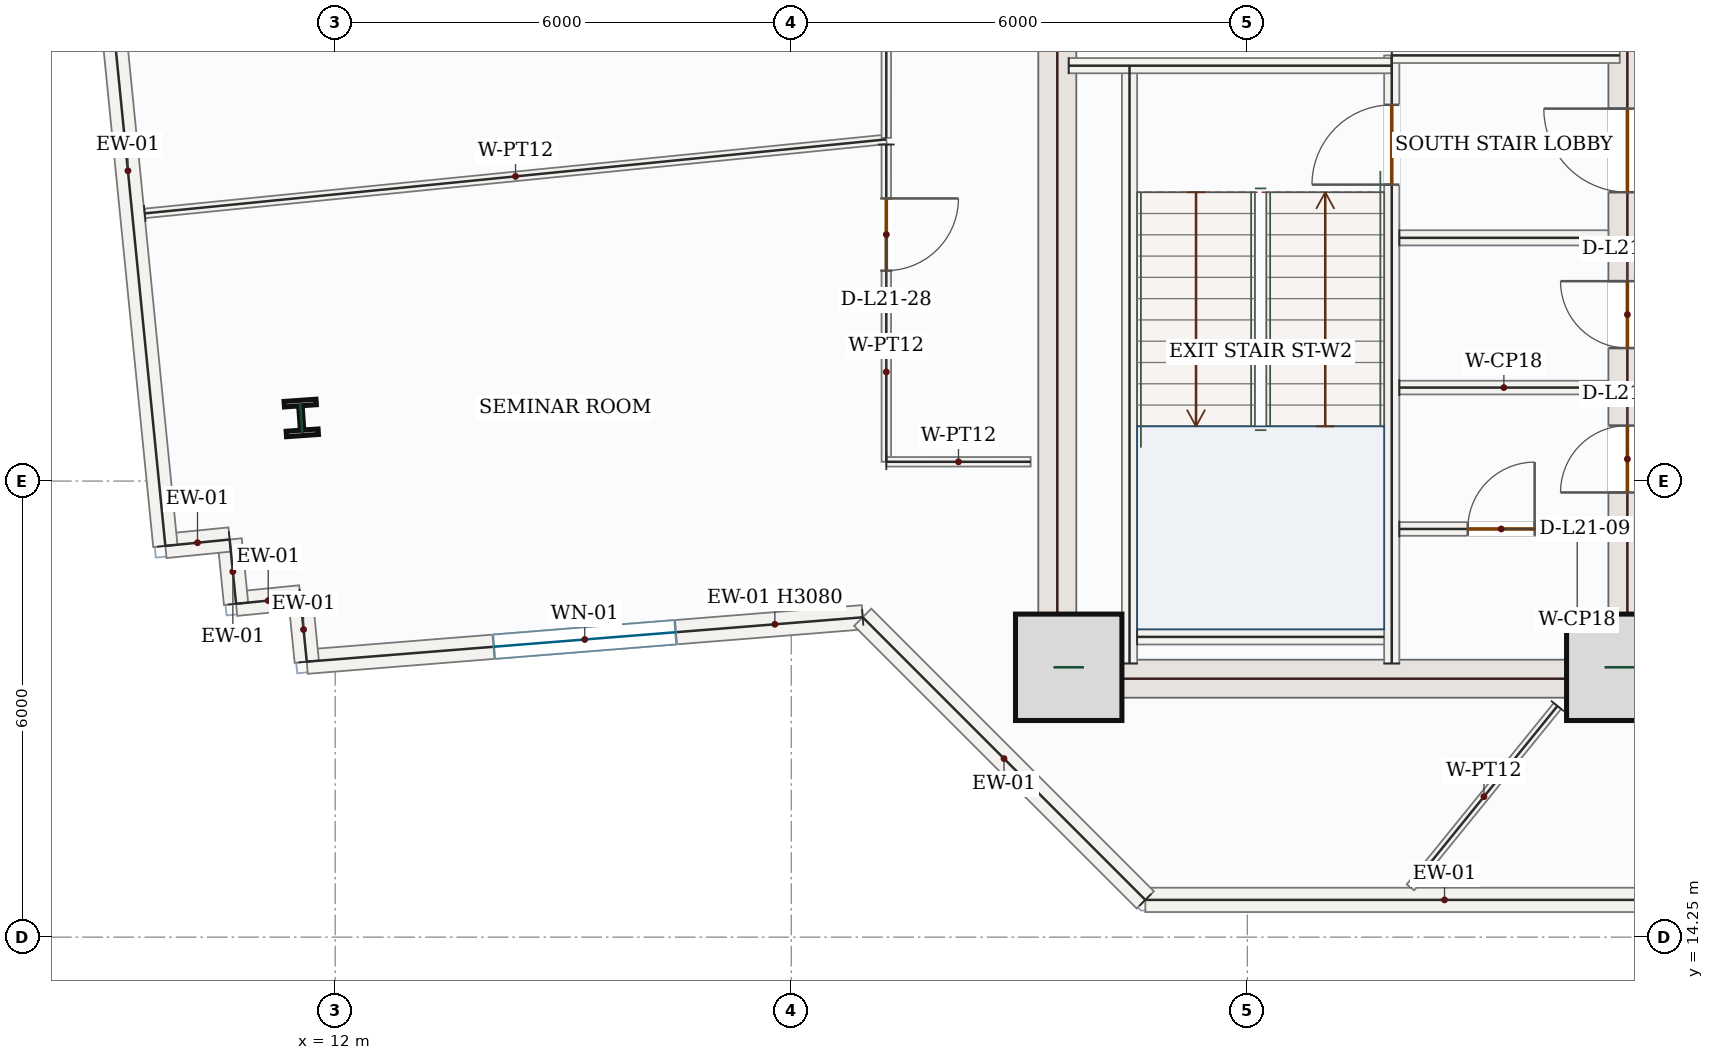
"""IFC4 building model, lengths in metres.
Left out: names, types, materials, properties, quantities, classifications, styles, units other than length and angle.
Written with IfcOpenShell. Run it as: python <this file> out.ifc"""

import sys

from ifc_helpers import new_model, si_unit, direction, frame, frame_2d, origin, origin_2d, place, context, subcontext, project, spatial, rectangle, i_section, extrude, source, transform, mapped, element, fill, save


model = new_model("IFC4")
c1 = context("Model", 3, precision=1e-05, world=origin(), true_north=direction((0.0, 1.0)))
c2 = subcontext(c1, "Body", "Model", "MODEL_VIEW")
j1 = project(units=[si_unit("LENGTHUNIT", "METRE"), si_unit("PLANEANGLEUNIT", "RADIAN")], contexts=[c1])
p1 = place(None, origin())
s1 = spatial("IfcSite", under=j1, at=p1, CompositionType="ELEMENT")
p2 = place(p1, origin())
s2 = spatial("IfcBuilding", under=s1, at=p2, CompositionType="ELEMENT")
p3 = place(p2, frame((0.0, 0.0, 96.3)))
s3 = spatial("IfcBuildingStorey", under=s2, at=p3, CompositionType="ELEMENT", Elevation=96.3)
m1 = source(origin(), c2, "Body", "SweptSolid", [
    extrude(rectangle(XDim=8.55, YDim=0.5, at=frame_2d((4.275, 0.0))), origin(), (0.0, 0.0, 1.0), 3.95),
])
p4 = place(p3, frame((21.5, 17.4, 0.0), z_axis=(0.0, 0.0, 1.0), x_axis=(0.0, 1.0, 0.0)))
e1 = element("IfcWall", 1, at=p4, inside=s3, PredefinedType="SHEAR", context=c2, shape_type="MappedRepresentation", body=[
    mapped(m1, transform((0.0, 0.0, 0.0), x_axis=(1.0, 0.0, 0.0), y_axis=(0.0, 1.0, 0.0), z_axis=(0.0, 0.0, 1.0), scale=1.0)),
])
p5 = place(p3, frame((29.0, 17.4, 0.0), z_axis=(0.0, 0.0, 1.0), x_axis=(0.0, 1.0, 0.0)))
e2 = element("IfcWall", 2, at=p5, inside=s3, PredefinedType="SHEAR", context=c2, shape_type="SweptSolid", body=[
    extrude(rectangle(XDim=8.55, YDim=0.5, at=frame_2d((4.275, 0.0))), origin(), (0.0, 0.0, 1.0), 3.95),
])
p6 = place(p5, frame((6.65, 0.0, 0.0)))
e3 = element("IfcOpeningElement", 3, at=p6, cuts=e2, PredefinedType="OPENING", context=c2, shape_type="SweptSolid", body=[
    extrude(rectangle(XDim=1.1, YDim=2.2, at=frame_2d((0.55, 1.1))), frame((0.0, 0.26, 0.0), z_axis=(0.0, -1.0, 0.0), x_axis=(1.0, 0.0, 0.0)), (0.0, 0.0, 1.0), 0.52),
])
p7 = place(p5, frame((2.7, 0.0, 0.0)))
e4 = element("IfcOpeningElement", 4, at=p7, cuts=e2, PredefinedType="OPENING", context=c2, shape_type="SweptSolid", body=[
    extrude(rectangle(XDim=0.88, YDim=2.1, at=frame_2d((0.44, 1.05))), frame((0.0, 0.26, 0.0), z_axis=(0.0, -1.0, 0.0), x_axis=(1.0, 0.0, 0.0)), (0.0, 0.0, 1.0), 0.52),
])
p8 = place(p5, frame((4.6, 0.0, 0.0)))
e5 = element("IfcOpeningElement", 5, at=p8, cuts=e2, PredefinedType="OPENING", context=c2, shape_type="SweptSolid", body=[
    extrude(rectangle(XDim=0.88, YDim=2.1, at=frame_2d((0.44, 1.05))), frame((0.0, 0.26, 0.0), z_axis=(0.0, -1.0, 0.0), x_axis=(1.0, 0.0, 0.0)), (0.0, 0.0, 1.0), 0.52),
])
m2 = source(origin(), c2, "Body", "SweptSolid", [
    extrude(rectangle(XDim=7.0, YDim=0.5, at=frame_2d((3.5, 0.0))), origin(), (0.0, 0.0, 1.0), 3.95),
])
p9 = place(p3, frame((21.75, 17.65, 0.0), z_axis=(0.0, 0.0, 1.0), x_axis=(1.0, 0.0, 0.0)))
e6 = element("IfcWall", 6, at=p9, inside=s3, PredefinedType="SHEAR", context=c2, shape_type="MappedRepresentation", body=[
    mapped(m2, transform((0.0, 0.0, 0.0), x_axis=(1.0, 0.0, 0.0), y_axis=(0.0, 1.0, 0.0), z_axis=(0.0, 0.0, 1.0), scale=1.0)),
])
m3 = source(origin(), c2, "Body", "SweptSolid", [
    extrude(rectangle(XDim=1.4, YDim=1.4, at=origin_2d()), origin(), (0.0, 0.0, 1.0), 4.2),
])
for number, where, z_axis, x_axis in (
    (7, (21.65, 17.8, 0.0), (0.0, 0.0, 1.0), (1.0, 0.0, 0.0)),
    (8, (28.9, 17.8, 0.0), (0.0, 0.0, 1.0), (1.0, 0.0, 0.0)),
):
    element("IfcColumn", number, at=place(p3, frame(where, z_axis=z_axis, x_axis=x_axis)), inside=s3, PredefinedType="COLUMN", context=c2, shape_type="MappedRepresentation", body=[
        mapped(m3, transform((0.0, 0.0, 0.0), x_axis=(1.0, 0.0, 0.0), y_axis=(0.0, 1.0, 0.0), z_axis=(0.0, 0.0, 1.0), scale=1.0)),
    ])
m4 = source(origin(), c2, "Body", "SweptSolid", [
    extrude(i_section(OverallWidth=0.421, OverallDepth=0.465, WebThickness=0.045, FlangeThickness=0.073, FilletRadius=0.018, at=origin_2d()), origin(), (0.0, 0.0, 1.0), 4.2),
])
p10 = place(p3, frame((11.553, 21.08, 0.0), z_axis=(0.0, 0.0, 1.0), x_axis=(0.99756405026, 0.069756473744, 0.0)))
e9 = element("IfcColumn", 9, at=p10, inside=s3, PredefinedType="COLUMN", context=c2, shape_type="MappedRepresentation", body=[
    mapped(m4, transform((0.0, 0.0, 0.0), x_axis=(1.0, 0.0, 0.0), y_axis=(0.0, 1.0, 0.0), z_axis=(0.0, 0.0, 1.0), scale=1.0)),
])
p11 = place(p3, frame((18.94, 18.458, 0.0), z_axis=(0.0, 0.0, 1.0), x_axis=(-0.996827539556, -0.079591811023, 0.0)))
e10 = element("IfcWall", 10, at=p11, inside=s3, PredefinedType="SOLIDWALL", context=c2, shape_type="SweptSolid", body=[
    extrude(rectangle(XDim=7.337, YDim=0.32, at=frame_2d((3.668, 0.0))), origin(), (0.0, 0.0, 1.0), 3.08),
])
p12 = place(p11, frame((2.469, 0.0, 0.85)))
e11 = element("IfcOpeningElement", 11, at=p12, cuts=e10, PredefinedType="OPENING", context=c2, shape_type="SweptSolid", body=[
    extrude(rectangle(XDim=2.4, YDim=1.8, at=frame_2d((1.2, 0.9))), frame((0.0, 0.17, 0.0), z_axis=(0.0, -1.0, 0.0), x_axis=(1.0, 0.0, 0.0)), (0.0, 0.0, 1.0), 0.34),
])
m5 = source(origin(), c2, "Body", "SweptSolid", [
    extrude(rectangle(XDim=0.85, YDim=0.32, at=frame_2d((0.425, 0.0))), origin(), (0.0, 0.0, 1.0), 3.95),
])
p13 = place(p3, frame((11.626, 17.874, 0.0), z_axis=(0.0, 0.0, 1.0), x_axis=(-0.09938995433, 0.995048560111, 0.0)))
e12 = element("IfcWall", 12, at=p13, inside=s3, PredefinedType="SOLIDWALL", context=c2, shape_type="MappedRepresentation", body=[
    mapped(m5, transform((0.0, 0.0, 0.0), x_axis=(1.0, 0.0, 0.0), y_axis=(0.0, 1.0, 0.0), z_axis=(0.0, 0.0, 1.0), scale=1.0)),
])
m6 = source(origin(), c2, "Body", "SweptSolid", [
    extrude(rectangle(XDim=0.85, YDim=0.32, at=frame_2d((0.425, 0.0))), origin(), (0.0, 0.0, 1.0), 3.95),
])
p14 = place(p3, frame((11.542, 18.72, 0.0), z_axis=(0.0, 0.0, 1.0), x_axis=(-0.995079749343, -0.09907720448, 0.0)))
e13 = element("IfcWall", 13, at=p14, inside=s3, PredefinedType="SOLIDWALL", context=c2, shape_type="MappedRepresentation", body=[
    mapped(m6, transform((0.0, 0.0, 0.0), x_axis=(1.0, 0.0, 0.0), y_axis=(0.0, 1.0, 0.0), z_axis=(0.0, 0.0, 1.0), scale=1.0)),
])
for number, where, z_axis, x_axis in (
    (14, (10.696, 18.635, 0.0), (0.0, 0.0, 1.0), (-0.099, 0.995, 0.0)),
    (15, (10.611, 19.481, 0.0), (0.0, 0.0, 1.0), (-0.995, -0.099, 0.0)),
):
    element("IfcWall", number, at=place(p3, frame(where, z_axis=z_axis, x_axis=x_axis)), inside=s3, PredefinedType="SOLIDWALL", context=c2, shape_type="MappedRepresentation", body=[
        mapped(m5, transform((0.0, 0.0, 0.0), x_axis=(1.0, 0.0, 0.0), y_axis=(0.0, 1.0, 0.0), z_axis=(0.0, 0.0, 1.0), scale=1.0)),
    ])
m7 = source(origin(), c2, "Body", "SweptSolid", [
    extrude(rectangle(XDim=9.92, YDim=0.32, at=frame_2d((4.96, 0.0))), origin(), (0.0, 0.0, 1.0), 3.95),
])
p15 = place(p3, frame((9.765, 19.397, 0.0), z_axis=(0.0, 0.0, 1.0), x_axis=(-0.099303907908, 0.995057151059, 0.0)))
e16 = element("IfcWall", 16, at=p15, inside=s3, PredefinedType="SOLIDWALL", context=c2, shape_type="MappedRepresentation", body=[
    mapped(m7, transform((0.0, 0.0, 0.0), x_axis=(1.0, 0.0, 0.0), y_axis=(0.0, 1.0, 0.0), z_axis=(0.0, 0.0, 1.0), scale=1.0)),
])
m8 = source(origin(), c2, "Body", "SweptSolid", [
    extrude(rectangle(XDim=7.873, YDim=0.32, at=frame_2d((3.936, 0.0))), origin(), (0.0, 0.0, 1.0), 3.95),
])
p16 = place(p3, frame((30.531, 14.74, 0.0), z_axis=(0.0, 0.0, 1.0), x_axis=(-1.0, 0.0, 0.0)))
e17 = element("IfcWall", 17, at=p16, inside=s3, PredefinedType="SOLIDWALL", context=c2, shape_type="MappedRepresentation", body=[
    mapped(m8, transform((0.0, 0.0, 0.0), x_axis=(1.0, 0.0, 0.0), y_axis=(0.0, 1.0, 0.0), z_axis=(0.0, 0.0, 1.0), scale=1.0)),
])
m9 = source(origin(), c2, "Body", "SweptSolid", [
    extrude(rectangle(XDim=5.258, YDim=0.32, at=frame_2d((2.629, 0.0))), origin(), (0.0, 0.0, 1.0), 3.95),
])
p17 = place(p3, frame((22.658, 14.74, 0.0), z_axis=(0.0, 0.0, 1.0), x_axis=(-0.707106781187, 0.707106781187, 0.0)))
e18 = element("IfcWall", 18, at=p17, inside=s3, PredefinedType="SOLIDWALL", context=c2, shape_type="MappedRepresentation", body=[
    mapped(m9, transform((0.0, 0.0, 0.0), x_axis=(1.0, 0.0, 0.0), y_axis=(0.0, 1.0, 0.0), z_axis=(0.0, 0.0, 1.0), scale=1.0)),
])
m10 = source(origin(), c2, "Body", "SweptSolid", [
    extrude(rectangle(XDim=7.87, YDim=0.2, at=frame_2d((3.935, 0.0))), origin(), (0.0, 0.0, 1.0), 3.95),
])
p18 = place(p3, frame((22.45, 17.85, 0.0), z_axis=(0.0, 0.0, 1.0), x_axis=(0.0, 1.0, 0.0)))
e19 = element("IfcWall", 19, at=p18, inside=s3, PredefinedType="SOLIDWALL", context=c2, shape_type="MappedRepresentation", body=[
    mapped(m10, transform((0.0, 0.0, 0.0), x_axis=(1.0, 0.0, 0.0), y_axis=(0.0, 1.0, 0.0), z_axis=(0.0, 0.0, 1.0), scale=1.0)),
])
p19 = place(p3, frame((25.9, 17.85, 0.0), z_axis=(0.0, 0.0, 1.0), x_axis=(0.0, 1.0, 0.0)))
e20 = element("IfcWall", 20, at=p19, inside=s3, PredefinedType="SOLIDWALL", context=c2, shape_type="SweptSolid", body=[
    extrude(rectangle(XDim=8.0, YDim=0.2, at=frame_2d((4.0, 0.0))), origin(), (0.0, 0.0, 1.0), 3.95),
])
p20 = place(p19, frame((6.3, 0.0, 0.0)))
e21 = element("IfcOpeningElement", 21, at=p20, cuts=e20, PredefinedType="OPENING", context=c2, shape_type="SweptSolid", body=[
    extrude(rectangle(XDim=1.05, YDim=2.15, at=frame_2d((0.525, 1.075))), frame((0.0, 0.11, 0.0), z_axis=(0.0, -1.0, 0.0), x_axis=(1.0, 0.0, 0.0)), (0.0, 0.0, 1.0), 0.22),
])
m11 = source(origin(), c2, "Body", "SweptSolid", [
    extrude(rectangle(XDim=4.25, YDim=0.2, at=frame_2d((2.125, 0.0))), origin(), (0.0, 0.0, 1.0), 3.95),
])
p21 = place(p3, frame((21.65, 25.715, 0.0), z_axis=(0.0, 0.0, 1.0), x_axis=(1.0, 0.0, 0.0)))
e22 = element("IfcWall", 22, at=p21, inside=s3, PredefinedType="SOLIDWALL", context=c2, shape_type="MappedRepresentation", body=[
    mapped(m11, transform((0.0, 0.0, 0.0), x_axis=(1.0, 0.0, 0.0), y_axis=(0.0, 1.0, 0.0), z_axis=(0.0, 0.0, 1.0), scale=1.0)),
])
m12 = source(origin(), c2, "Body", "SweptSolid", [
    extrude(rectangle(XDim=3.0, YDim=0.2, at=frame_2d((1.5, 0.0))), origin(), (0.0, 0.0, 1.0), 3.95),
])
p22 = place(p3, frame((25.9, 25.85, 0.0), z_axis=(0.0, 0.0, 1.0), x_axis=(1.0, 0.0, 0.0)))
e23 = element("IfcWall", 23, at=p22, inside=s3, PredefinedType="SOLIDWALL", context=c2, shape_type="MappedRepresentation", body=[
    mapped(m12, transform((0.0, 0.0, 0.0), x_axis=(1.0, 0.0, 0.0), y_axis=(0.0, 1.0, 0.0), z_axis=(0.0, 0.0, 1.0), scale=1.0)),
])
m13 = source(origin(), c2, "Body", "SweptSolid", [
    extrude(rectangle(XDim=3.25, YDim=0.2, at=frame_2d((1.625, 0.0))), origin(), (0.0, 0.0, 1.0), 3.95),
])
p23 = place(p3, frame((22.55, 18.2, 0.0), z_axis=(0.0, 0.0, 1.0), x_axis=(1.0, 0.0, 0.0)))
e24 = element("IfcWall", 24, at=p23, inside=s3, PredefinedType="SOLIDWALL", context=c2, shape_type="MappedRepresentation", body=[
    mapped(m13, transform((0.0, 0.0, 0.0), x_axis=(1.0, 0.0, 0.0), y_axis=(0.0, 1.0, 0.0), z_axis=(0.0, 0.0, 1.0), scale=1.0)),
])
m14 = source(origin(), c2, "Body", "SweptSolid", [
    extrude(rectangle(XDim=2.75, YDim=0.2, at=frame_2d((1.375, 0.0))), origin(), (0.0, 0.0, 1.0), 3.95),
])
p24 = place(p3, frame((26.0, 23.45, 0.0), z_axis=(0.0, 0.0, 1.0), x_axis=(1.0, 0.0, 0.0)))
e25 = element("IfcWall", 25, at=p24, inside=s3, PredefinedType="SOLIDWALL", context=c2, shape_type="MappedRepresentation", body=[
    mapped(m14, transform((0.0, 0.0, 0.0), x_axis=(1.0, 0.0, 0.0), y_axis=(0.0, 1.0, 0.0), z_axis=(0.0, 0.0, 1.0), scale=1.0)),
])
p25 = place(p3, frame((26.0, 19.62, 0.0), z_axis=(0.0, 0.0, 1.0), x_axis=(1.0, 0.0, 0.0)))
e26 = element("IfcWall", 26, at=p25, inside=s3, PredefinedType="PARTITIONING", context=c2, shape_type="SweptSolid", body=[
    extrude(rectangle(XDim=2.75, YDim=0.18, at=frame_2d((1.375, 0.0))), origin(), (0.0, 0.0, 1.0), 3.95),
])
p26 = place(p25, frame((0.9, 0.0, 0.0)))
e27 = element("IfcOpeningElement", 27, at=p26, cuts=e26, PredefinedType="OPENING", context=c2, shape_type="SweptSolid", body=[
    extrude(rectangle(XDim=0.88, YDim=2.1, at=frame_2d((0.44, 1.05))), frame((0.0, 0.1, 0.0), z_axis=(0.0, -1.0, 0.0), x_axis=(1.0, 0.0, 0.0)), (0.0, 0.0, 1.0), 0.2),
])
m15 = source(origin(), c2, "Body", "SweptSolid", [
    extrude(rectangle(XDim=2.75, YDim=0.18, at=frame_2d((1.375, 0.0))), origin(), (0.0, 0.0, 1.0), 3.95),
])
p27 = place(p3, frame((26.0, 21.48, 0.0), z_axis=(0.0, 0.0, 1.0), x_axis=(1.0, 0.0, 0.0)))
e28 = element("IfcWall", 28, at=p27, inside=s3, PredefinedType="PARTITIONING", context=c2, shape_type="MappedRepresentation", body=[
    mapped(m15, transform((0.0, 0.0, 0.0), x_axis=(1.0, 0.0, 0.0), y_axis=(0.0, 1.0, 0.0), z_axis=(0.0, 0.0, 1.0), scale=1.0)),
])
m16 = source(origin(), c2, "Body", "SweptSolid", [
    extrude(rectangle(XDim=3.072, YDim=0.125, at=frame_2d((1.536, 0.0))), origin(), (0.0, 0.0, 1.0), 3.95),
])
p28 = place(p3, frame((28.08, 17.291, 0.0), z_axis=(0.0, 0.0, 1.0), x_axis=(-0.629760486176, -0.776789373029, 0.0)))
e29 = element("IfcWall", 29, at=p28, inside=s3, PredefinedType="PARTITIONING", context=c2, shape_type="MappedRepresentation", body=[
    mapped(m16, transform((0.0, 0.0, 0.0), x_axis=(1.0, 0.0, 0.0), y_axis=(0.0, 1.0, 0.0), z_axis=(0.0, 0.0, 1.0), scale=1.0)),
])
m17 = source(origin(), c2, "Body", "SweptSolid", [
    extrude(rectangle(XDim=9.804, YDim=0.125, at=frame_2d((4.902, 0.0))), origin(), (0.0, 0.0, 1.0), 3.95),
])
p29 = place(p3, frame((9.495, 23.771, 0.0), z_axis=(0.0, 0.0, 1.0), x_axis=(0.995053942122, 0.099336057238, 0.0)))
e30 = element("IfcWall", 30, at=p29, inside=s3, PredefinedType="PARTITIONING", context=c2, shape_type="MappedRepresentation", body=[
    mapped(m17, transform((0.0, 0.0, 0.0), x_axis=(1.0, 0.0, 0.0), y_axis=(0.0, 1.0, 0.0), z_axis=(0.0, 0.0, 1.0), scale=1.0)),
])
p30 = place(p3, frame((19.25, 24.677, 0.0), z_axis=(0.0, 0.0, 1.0), x_axis=(0.000116979586, -0.999999993158, 0.0)))
e31 = element("IfcWall", 31, at=p30, inside=s3, PredefinedType="PARTITIONING", context=c2, shape_type="SweptSolid", body=[
    extrude(rectangle(XDim=4.174, YDim=0.125, at=frame_2d((2.087, 0.0))), origin(), (0.0, 0.0, 1.0), 3.95),
])
p31 = place(p30, frame((0.709, 0.0, 0.0)))
e32 = element("IfcOpeningElement", 32, at=p31, cuts=e31, PredefinedType="OPENING", context=c2, shape_type="SweptSolid", body=[
    extrude(rectangle(XDim=0.95, YDim=2.15, at=frame_2d((0.475, 1.075))), frame((0.0, 0.073, 0.0), z_axis=(0.0, -1.0, 0.0), x_axis=(1.0, 0.0, 0.0)), (0.0, 0.0, 1.0), 0.145),
])
m18 = source(origin(), c2, "Body", "SweptSolid", [
    extrude(rectangle(XDim=1.899, YDim=0.125, at=frame_2d((0.949, 0.0))), origin(), (0.0, 0.0, 1.0), 3.95),
])
p32 = place(p3, frame((19.25, 20.503, 0.0), z_axis=(0.0, 0.0, 1.0), x_axis=(0.999999991735, 0.000128567754, 0.0)))
e33 = element("IfcWall", 33, at=p32, inside=s3, PredefinedType="PARTITIONING", context=c2, shape_type="MappedRepresentation", body=[
    mapped(m18, transform((0.0, 0.0, 0.0), x_axis=(1.0, 0.0, 0.0), y_axis=(0.0, 1.0, 0.0), z_axis=(0.0, 0.0, 1.0), scale=1.0)),
])
p33 = place(p3, frame((19.253, 33.497, 0.0), z_axis=(0.0, 0.0, 1.0), x_axis=(-0.000307554646, -0.999999952705, 0.0)))
e34 = element("IfcWall", 34, at=p33, inside=s3, PredefinedType="PARTITIONING", context=c2, shape_type="SweptSolid", body=[
    extrude(rectangle(XDim=8.732, YDim=0.125, at=frame_2d((4.366, 0.0))), origin(), (0.0, 0.0, 1.0), 3.95),
])
p34 = place(p33, frame((6.07, 0.0, 0.0)))
e35 = element("IfcOpeningElement", 35, at=p34, cuts=e34, PredefinedType="OPENING", context=c2, shape_type="SweptSolid", body=[
    extrude(rectangle(XDim=0.95, YDim=2.15, at=frame_2d((0.475, 1.075))), frame((0.0, 0.073, 0.0), z_axis=(0.0, -1.0, 0.0), x_axis=(1.0, 0.0, 0.0)), (0.0, 0.0, 1.0), 0.145),
])
m19 = source(origin(), c2, "Body", "SweptSolid", [
    extrude(rectangle(XDim=2.4, YDim=1.8, at=frame_2d((1.2, 0.9))), frame((0.0, 0.03, 0.0), z_axis=(0.0, -1.0, 0.0), x_axis=(1.0, 0.0, 0.0)), (0.0, 0.0, 1.0), 0.06),
])
p35 = place(p12, origin())
e36 = element("IfcWindow", 36, at=p35, inside=s3, PartitioningType="DOUBLE_PANEL_VERTICAL", PredefinedType="WINDOW", context=c2, shape_type="MappedRepresentation", body=[
    mapped(m19, transform((0.0, 0.0, 0.0), x_axis=(1.0, 0.0, 0.0), y_axis=(0.0, 1.0, 0.0), z_axis=(0.0, 0.0, 1.0), scale=1.0)),
])
fill(e11, e36)
m20 = source(origin(), c2, "Body", "SweptSolid", [
    extrude(rectangle(XDim=1.05, YDim=2.15, at=frame_2d((0.525, 1.075))), frame((0.0, 0.025, 0.0), z_axis=(0.0, -1.0, 0.0), x_axis=(1.0, 0.0, 0.0)), (0.0, 0.0, 1.0), 0.05),
])
p36 = place(p20, origin())
e37 = element("IfcDoor", 37, at=p36, inside=s3, OperationType="SINGLE_SWING_LEFT", PredefinedType="DOOR", context=c2, shape_type="MappedRepresentation", body=[
    mapped(m20, transform((0.0, 0.0, 0.0), x_axis=(1.0, 0.0, 0.0), y_axis=(0.0, 1.0, 0.0), z_axis=(0.0, 0.0, 1.0), scale=1.0)),
])
fill(e21, e37)
m21 = source(origin(), c2, "Body", "SweptSolid", [
    extrude(rectangle(XDim=1.1, YDim=2.2, at=frame_2d((0.55, 1.1))), frame((0.0, 0.025, 0.0), z_axis=(0.0, -1.0, 0.0), x_axis=(1.0, 0.0, 0.0)), (0.0, 0.0, 1.0), 0.05),
])
p37 = place(p6, origin())
e38 = element("IfcDoor", 38, at=p37, inside=s3, OperationType="SINGLE_SWING_RIGHT", PredefinedType="DOOR", context=c2, shape_type="MappedRepresentation", body=[
    mapped(m21, transform((0.0, 0.0, 0.0), x_axis=(1.0, 0.0, 0.0), y_axis=(0.0, 1.0, 0.0), z_axis=(0.0, 0.0, 1.0), scale=1.0)),
])
fill(e3, e38)
m22 = source(origin(), c2, "Body", "SweptSolid", [
    extrude(rectangle(XDim=0.88, YDim=2.1, at=frame_2d((0.44, 1.05))), frame((0.0, 0.025, 0.0), z_axis=(0.0, -1.0, 0.0), x_axis=(1.0, 0.0, 0.0)), (0.0, 0.0, 1.0), 0.05),
])
p38 = place(p26, origin())
e39 = element("IfcDoor", 39, at=p38, inside=s3, OperationType="SINGLE_SWING_RIGHT", PredefinedType="DOOR", context=c2, shape_type="MappedRepresentation", body=[
    mapped(m22, transform((0.0, 0.0, 0.0), x_axis=(1.0, 0.0, 0.0), y_axis=(0.0, 1.0, 0.0), z_axis=(0.0, 0.0, 1.0), scale=1.0)),
])
fill(e27, e39)
p39 = place(p7, origin())
e40 = element("IfcDoor", 40, at=p39, inside=s3, OperationType="SINGLE_SWING_LEFT", PredefinedType="DOOR", context=c2, shape_type="MappedRepresentation", body=[
    mapped(m22, transform((0.0, 0.0, 0.0), x_axis=(1.0, 0.0, 0.0), y_axis=(0.0, 1.0, 0.0), z_axis=(0.0, 0.0, 1.0), scale=1.0)),
])
fill(e4, e40)
p40 = place(p8, origin())
e41 = element("IfcDoor", 41, at=p40, inside=s3, OperationType="SINGLE_SWING_RIGHT", PredefinedType="DOOR", context=c2, shape_type="MappedRepresentation", body=[
    mapped(m22, transform((0.0, 0.0, 0.0), x_axis=(1.0, 0.0, 0.0), y_axis=(0.0, 1.0, 0.0), z_axis=(0.0, 0.0, 1.0), scale=1.0)),
])
fill(e5, e41)
m23 = source(origin(), c2, "Body", "SweptSolid", [
    extrude(rectangle(XDim=0.95, YDim=2.15, at=frame_2d((0.475, 1.075))), frame((0.0, 0.025, 0.0), z_axis=(0.0, -1.0, 0.0), x_axis=(1.0, 0.0, 0.0)), (0.0, 0.0, 1.0), 0.05),
])
p41 = place(p31, origin())
e42 = element("IfcDoor", 42, at=p41, inside=s3, OperationType="SINGLE_SWING_LEFT", PredefinedType="DOOR", context=c2, shape_type="MappedRepresentation", body=[
    mapped(m23, transform((0.0, 0.0, 0.0), x_axis=(1.0, 0.0, 0.0), y_axis=(0.0, 1.0, 0.0), z_axis=(0.0, 0.0, 1.0), scale=1.0)),
])
fill(e32, e42)
save(model, sys.argv[1])
